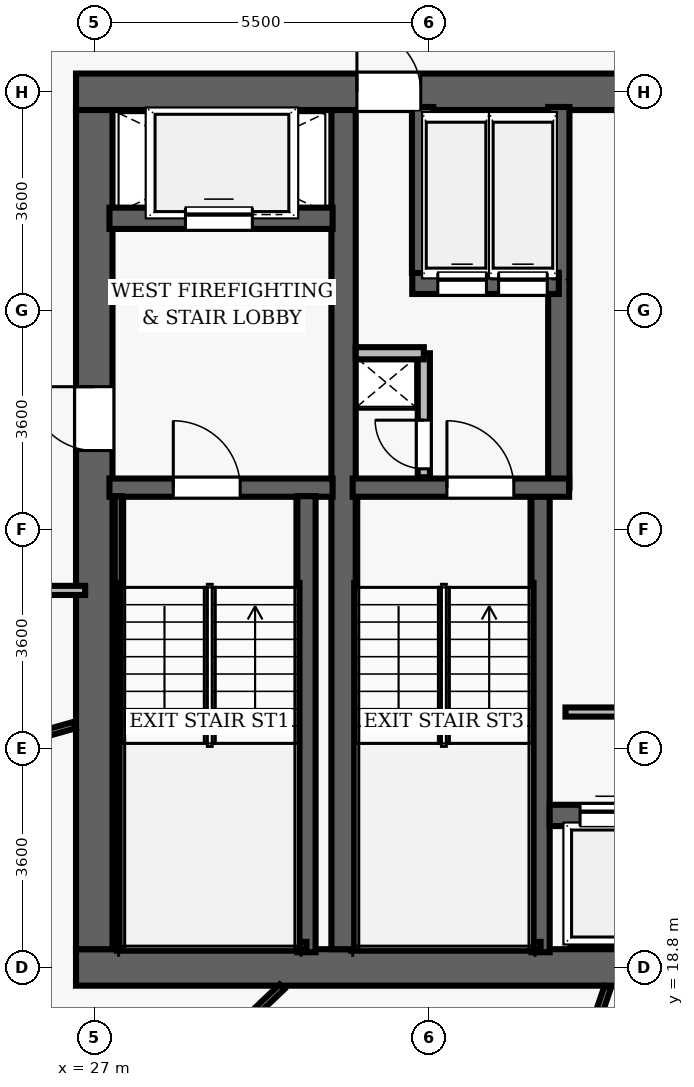
"""IFC4 building model, lengths in metres.
Left out: names, types, materials, properties, quantities, classifications, styles, units other than length and angle.
Written with IfcOpenShell. Run it as: python <this file> out.ifc"""

import sys

from ifc_helpers import new_model, si_unit, direction, frame, frame_2d, origin, place, context, subcontext, project, spatial, rectangle, extrude, element, fill, save


model = new_model("IFC4")
c1 = context("Model", 3, precision=1e-05, world=origin(), true_north=direction((0.0, 1.0)))
c2 = subcontext(c1, "Body", "Model", "MODEL_VIEW")
j1 = project(units=[si_unit("LENGTHUNIT", "METRE"), si_unit("PLANEANGLEUNIT", "RADIAN")], contexts=[c1])
p1 = place(None, origin())
s1 = spatial("IfcSite", under=j1, at=p1, CompositionType="ELEMENT")
p2 = place(p1, origin())
s2 = spatial("IfcBuilding", under=s1, at=p2, CompositionType="ELEMENT")
p3 = place(p2, frame((0.0, 0.0, 116.8)))
s3 = spatial("IfcBuildingStorey", under=s2, at=p3, CompositionType="ELEMENT", Elevation=116.8)
p4 = place(p3, frame((26.7, 18.8, 0.0), z_axis=(0.0, 0.0, 1.0), x_axis=(1.0, 0.0, 0.0)))
e1 = element("IfcWall", 1, at=p4, inside=s3, PredefinedType="SHEAR", context=c2, shape_type="SweptSolid", body=[
    extrude(rectangle(XDim=22.6, YDim=0.6, at=frame_2d((11.3, 0.0))), origin(), (0.0, 0.0, 1.0), 3.5),
])
p5 = place(p4, frame((14.52, 0.0, 0.0)))
e2 = element("IfcOpeningElement", 2, at=p5, cuts=e1, PredefinedType="OPENING", context=c2, shape_type="SweptSolid", body=[
    extrude(rectangle(XDim=1.05, YDim=2.15, at=frame_2d((0.525, 1.075))), frame((0.0, 0.31, 0.0), z_axis=(0.0, -1.0, 0.0), x_axis=(1.0, 0.0, 0.0)), (0.0, 0.0, 1.0), 0.62),
])
p6 = place(p3, frame((26.7, 33.2, 0.0), z_axis=(0.0, 0.0, 1.0), x_axis=(1.0, 0.0, 0.0)))
e3 = element("IfcWall", 3, at=p6, inside=s3, PredefinedType="SHEAR", context=c2, shape_type="SweptSolid", body=[
    extrude(rectangle(XDim=22.6, YDim=0.6, at=frame_2d((11.3, 0.0))), origin(), (0.0, 0.0, 1.0), 3.5),
])
p7 = place(p6, frame((4.62, 0.0, 0.0)))
e4 = element("IfcOpeningElement", 4, at=p7, cuts=e3, PredefinedType="OPENING", context=c2, shape_type="SweptSolid", body=[
    extrude(rectangle(XDim=1.05, YDim=2.15, at=frame_2d((0.525, 1.075))), frame((0.0, 0.31, 0.0), z_axis=(0.0, -1.0, 0.0), x_axis=(1.0, 0.0, 0.0)), (0.0, 0.0, 1.0), 0.62),
])
p8 = place(p6, frame((14.52, 0.0, 0.0)))
e5 = element("IfcOpeningElement", 5, at=p8, cuts=e3, PredefinedType="OPENING", context=c2, shape_type="SweptSolid", body=[
    extrude(rectangle(XDim=1.05, YDim=2.15, at=frame_2d((0.525, 1.075))), frame((0.0, 0.31, 0.0), z_axis=(0.0, -1.0, 0.0), x_axis=(1.0, 0.0, 0.0)), (0.0, 0.0, 1.0), 0.62),
])
p9 = place(p3, frame((27.0, 19.1, 0.0), z_axis=(0.0, 0.0, 1.0), x_axis=(0.0, 1.0, 0.0)))
e6 = element("IfcWall", 6, at=p9, inside=s3, PredefinedType="SHEAR", context=c2, shape_type="SweptSolid", body=[
    extrude(rectangle(XDim=13.8, YDim=0.6, at=frame_2d((6.9, 0.0))), origin(), (0.0, 0.0, 1.0), 3.5),
])
p10 = place(p9, frame((8.2, 0.0, 0.0)))
e7 = element("IfcOpeningElement", 7, at=p10, cuts=e6, PredefinedType="OPENING", context=c2, shape_type="SweptSolid", body=[
    extrude(rectangle(XDim=1.05, YDim=2.15, at=frame_2d((0.525, 1.075))), frame((0.0, 0.31, 0.0), z_axis=(0.0, -1.0, 0.0), x_axis=(1.0, 0.0, 0.0)), (0.0, 0.0, 1.0), 0.62),
])
p11 = place(p3, frame((31.1, 19.1, 0.0), z_axis=(0.0, 0.0, 1.0), x_axis=(0.0, 1.0, 0.0)))
e8 = element("IfcWall", 8, at=p11, inside=s3, PredefinedType="SHEAR", context=c2, shape_type="SweptSolid", body=[
    extrude(rectangle(XDim=13.8, YDim=0.4, at=frame_2d((6.9, 0.0))), origin(), (0.0, 0.0, 1.0), 3.5),
])
p12 = place(p3, frame((27.25, 26.69, 0.0), z_axis=(0.0, 0.0, 1.0), x_axis=(1.0, 0.0, 0.0)))
e9 = element("IfcWall", 9, at=p12, inside=s3, PredefinedType="SHEAR", context=c2, shape_type="SweptSolid", body=[
    extrude(rectangle(XDim=3.67, YDim=0.3, at=frame_2d((1.835, 0.0))), origin(), (0.0, 0.0, 1.0), 3.5),
])
p13 = place(p12, frame((1.05, 0.0, 0.0)))
e10 = element("IfcOpeningElement", 10, at=p13, cuts=e9, PredefinedType="OPENING", context=c2, shape_type="SweptSolid", body=[
    extrude(rectangle(XDim=1.1, YDim=2.15, at=frame_2d((0.55, 1.075))), frame((0.0, 0.16, 0.0), z_axis=(0.0, -1.0, 0.0), x_axis=(1.0, 0.0, 0.0)), (0.0, 0.0, 1.0), 0.32),
])
p14 = place(p3, frame((30.49, 19.05, 0.0), z_axis=(0.0, 0.0, 1.0), x_axis=(0.0, 1.0, 0.0)))
e11 = element("IfcWall", 11, at=p14, inside=s3, PredefinedType="SHEAR", context=c2, shape_type="SweptSolid", body=[
    extrude(rectangle(XDim=7.5, YDim=0.3, at=frame_2d((3.75, 0.0))), origin(), (0.0, 0.0, 1.0), 3.5),
])
p15 = place(p3, frame((27.395, 19.1, 0.0), z_axis=(0.0, 0.0, 1.0), x_axis=(0.0, 1.0, 0.0)))
e12 = element("IfcWall", 12, at=p15, inside=s3, PredefinedType="SHEAR", context=c2, shape_type="SweptSolid", body=[
    extrude(rectangle(XDim=7.45, YDim=0.12, at=frame_2d((3.725, 0.0))), origin(), (0.0, 0.0, 1.0), 3.5),
])
p16 = place(p3, frame((27.395, 19.16, 0.0), z_axis=(0.0, 0.0, 1.0), x_axis=(1.0, 0.0, 0.0)))
e13 = element("IfcWall", 13, at=p16, inside=s3, PredefinedType="SHEAR", context=c2, shape_type="SweptSolid", body=[
    extrude(rectangle(XDim=3.095, YDim=0.12, at=frame_2d((1.547, 0.0))), origin(), (0.0, 0.0, 1.0), 3.5),
])
p17 = place(p3, frame((27.25, 31.12, 0.0), z_axis=(0.0, 0.0, 1.0), x_axis=(1.0, 0.0, 0.0)))
e14 = element("IfcWall", 14, at=p17, inside=s3, PredefinedType="SHEAR", context=c2, shape_type="SweptSolid", body=[
    extrude(rectangle(XDim=3.67, YDim=0.35, at=frame_2d((1.835, 0.0))), origin(), (0.0, 0.0, 1.0), 2.675),
])
p18 = place(p17, frame((1.25, 0.0, 0.0)))
e15 = element("IfcOpeningElement", 15, at=p18, cuts=e14, PredefinedType="OPENING", context=c2, shape_type="SweptSolid", body=[
    extrude(rectangle(XDim=1.1, YDim=2.15, at=frame_2d((0.55, 1.075))), frame((0.0, 0.185, 0.0), z_axis=(0.0, -1.0, 0.0), x_axis=(1.0, 0.0, 0.0)), (0.0, 0.0, 1.0), 0.37),
])
p19 = place(p3, frame((34.34, 19.05, 0.0), z_axis=(0.0, 0.0, 1.0), x_axis=(0.0, 1.0, 0.0)))
e16 = element("IfcWall", 16, at=p19, inside=s3, PredefinedType="SHEAR", context=c2, shape_type="SweptSolid", body=[
    extrude(rectangle(XDim=7.5, YDim=0.3, at=frame_2d((3.75, 0.0))), origin(), (0.0, 0.0, 1.0), 3.5),
])
p20 = place(p3, frame((34.64, 26.69, 0.0), z_axis=(0.0, 0.0, 1.0), x_axis=(0.0, 1.0, 0.0)))
e17 = element("IfcWall", 17, at=p20, inside=s3, PredefinedType="SHEAR", context=c2, shape_type="SweptSolid", body=[
    extrude(rectangle(XDim=6.26, YDim=0.35, at=frame_2d((3.13, 0.0))), origin(), (0.0, 0.0, 1.0), 3.5),
])
p21 = place(p3, frame((31.25, 26.69, 0.0), z_axis=(0.0, 0.0, 1.0), x_axis=(1.0, 0.0, 0.0)))
e18 = element("IfcWall", 18, at=p21, inside=s3, PredefinedType="SHEAR", context=c2, shape_type="SweptSolid", body=[
    extrude(rectangle(XDim=3.56, YDim=0.3, at=frame_2d((1.78, 0.0))), origin(), (0.0, 0.0, 1.0), 3.5),
])
p22 = place(p21, frame((1.55, 0.0, 0.0)))
e19 = element("IfcOpeningElement", 19, at=p22, cuts=e18, PredefinedType="OPENING", context=c2, shape_type="SweptSolid", body=[
    extrude(rectangle(XDim=1.1, YDim=2.15, at=frame_2d((0.55, 1.075))), frame((0.0, 0.16, 0.0), z_axis=(0.0, -1.0, 0.0), x_axis=(1.0, 0.0, 0.0)), (0.0, 0.0, 1.0), 0.32),
])
p23 = place(p3, frame((31.3, 19.16, 0.0), z_axis=(0.0, 0.0, 1.0), x_axis=(1.0, 0.0, 0.0)))
e20 = element("IfcWall", 20, at=p23, inside=s3, PredefinedType="SHEAR", context=c2, shape_type="SweptSolid", body=[
    extrude(rectangle(XDim=3.04, YDim=0.12, at=frame_2d((1.52, 0.0))), origin(), (0.0, 0.0, 1.0), 3.5),
])
p24 = place(p3, frame((32.23, 30.05, 0.0), z_axis=(0.0, 0.0, 1.0), x_axis=(1.0, 0.0, 0.0)))
e21 = element("IfcWall", 21, at=p24, inside=s3, PredefinedType="SHEAR", context=c2, shape_type="SweptSolid", body=[
    extrude(rectangle(XDim=2.41, YDim=0.35, at=frame_2d((1.205, 0.0))), origin(), (0.0, 0.0, 1.0), 2.675),
])
p25 = place(p24, frame((0.42, 0.0, 0.0)))
e22 = element("IfcOpeningElement", 22, at=p25, cuts=e21, PredefinedType="OPENING", context=c2, shape_type="SweptSolid", body=[
    extrude(rectangle(XDim=0.8, YDim=2.15, at=frame_2d((0.4, 1.075))), frame((0.0, 0.185, 0.0), z_axis=(0.0, -1.0, 0.0), x_axis=(1.0, 0.0, 0.0)), (0.0, 0.0, 1.0), 0.37),
])
p26 = place(p24, frame((1.42, 0.0, 0.0)))
e23 = element("IfcOpeningElement", 23, at=p26, cuts=e21, PredefinedType="OPENING", context=c2, shape_type="SweptSolid", body=[
    extrude(rectangle(XDim=0.8, YDim=2.15, at=frame_2d((0.4, 1.075))), frame((0.0, 0.185, 0.0), z_axis=(0.0, -1.0, 0.0), x_axis=(1.0, 0.0, 0.0)), (0.0, 0.0, 1.0), 0.37),
])
p27 = place(p3, frame((32.4, 30.22, 0.0), z_axis=(0.0, 0.0, 1.0), x_axis=(0.0, 1.0, 0.0)))
e24 = element("IfcWall", 24, at=p27, inside=s3, PredefinedType="SHEAR", context=c2, shape_type="SweptSolid", body=[
    extrude(rectangle(XDim=2.73, YDim=0.35, at=frame_2d((1.365, 0.0))), origin(), (0.0, 0.0, 1.0), 2.675),
])
p28 = place(p3, frame((32.42, 26.86, 0.0), z_axis=(0.0, 0.0, 1.0), x_axis=(0.0, 1.0, 0.0)))
e25 = element("IfcWall", 25, at=p28, inside=s3, PredefinedType="PARTITIONING", context=c2, shape_type="SweptSolid", body=[
    extrude(rectangle(XDim=2.04, YDim=0.2, at=frame_2d((1.02, 0.0))), origin(), (0.0, 0.0, 1.0), 2.675),
])
p29 = place(p28, frame((0.14, 0.0, 0.0)))
e26 = element("IfcOpeningElement", 26, at=p29, cuts=e25, PredefinedType="OPENING", context=c2, shape_type="SweptSolid", body=[
    extrude(rectangle(XDim=0.8, YDim=2.05, at=frame_2d((0.4, 1.025))), frame((0.0, 0.11, 0.0), z_axis=(0.0, -1.0, 0.0), x_axis=(1.0, 0.0, 0.0)), (0.0, 0.0, 1.0), 0.22),
])
p30 = place(p3, frame((31.3, 28.9, 0.0), z_axis=(0.0, 0.0, 1.0), x_axis=(1.0, 0.0, 0.0)))
e27 = element("IfcWall", 27, at=p30, inside=s3, PredefinedType="PARTITIONING", context=c2, shape_type="SweptSolid", body=[
    extrude(rectangle(XDim=1.12, YDim=0.2, at=frame_2d((0.56, 0.0))), origin(), (0.0, 0.0, 1.0), 2.675),
])
p31 = place(p3, frame((34.49, 21.3, 0.0), z_axis=(0.0, 0.0, 1.0), x_axis=(1.0, 0.0, 0.0)))
e28 = element("IfcWall", 28, at=p31, inside=s3, PredefinedType="SHEAR", context=c2, shape_type="SweptSolid", body=[
    extrude(rectangle(XDim=6.68, YDim=0.35, at=frame_2d((3.34, 0.0))), origin(), (0.0, 0.0, 1.0), 2.675),
])
p32 = place(p31, frame((0.5, 0.0, 0.0)))
e29 = element("IfcOpeningElement", 29, at=p32, cuts=e28, PredefinedType="OPENING", context=c2, shape_type="SweptSolid", body=[
    extrude(rectangle(XDim=0.9, YDim=2.15, at=frame_2d((0.45, 1.075))), frame((0.0, 0.185, 0.0), z_axis=(0.0, -1.0, 0.0), x_axis=(1.0, 0.0, 0.0)), (0.0, 0.0, 1.0), 0.37),
])
p33 = place(p31, frame((2.58, 0.0, 0.0)))
e30 = element("IfcOpeningElement", 30, at=p33, cuts=e28, PredefinedType="OPENING", context=c2, shape_type="SweptSolid", body=[
    extrude(rectangle(XDim=0.9, YDim=2.15, at=frame_2d((0.45, 1.075))), frame((0.0, 0.185, 0.0), z_axis=(0.0, -1.0, 0.0), x_axis=(1.0, 0.0, 0.0)), (0.0, 0.0, 1.0), 0.37),
])
p34 = place(p31, frame((4.66, 0.0, 0.0)))
e31 = element("IfcOpeningElement", 31, at=p34, cuts=e28, PredefinedType="OPENING", context=c2, shape_type="SweptSolid", body=[
    extrude(rectangle(XDim=0.9, YDim=2.15, at=frame_2d((0.45, 1.075))), frame((0.0, 0.185, 0.0), z_axis=(0.0, -1.0, 0.0), x_axis=(1.0, 0.0, 0.0)), (0.0, 0.0, 1.0), 0.37),
])
p35 = place(p3, frame((34.75, 23.0, 0.0), z_axis=(0.0, 0.0, 1.0), x_axis=(1.0, 0.0, 0.0)))
e32 = element("IfcWall", 32, at=p35, inside=s3, PredefinedType="PARTITIONING", context=c2, shape_type="SweptSolid", body=[
    extrude(rectangle(XDim=6.25, YDim=0.15, at=frame_2d((3.125, 0.0))), origin(), (0.0, 0.0, 1.0), 2.675),
])
p36 = place(p3, frame((14.5, 25.0, 0.0), z_axis=(0.0, 0.0, 1.0), x_axis=(1.0, 0.0, 0.0)))
e33 = element("IfcWall", 33, at=p36, inside=s3, PredefinedType="PARTITIONING", context=c2, shape_type="SweptSolid", body=[
    extrude(rectangle(XDim=12.35, YDim=0.15, at=frame_2d((6.175, 0.0))), origin(), (0.0, 0.0, 1.0), 2.675),
])
p37 = place(p36, frame((8.788, 0.0, 0.0)))
e34 = element("IfcOpeningElement", 34, at=p37, cuts=e33, PredefinedType="OPENING", context=c2, shape_type="SweptSolid", body=[
    extrude(rectangle(XDim=0.95, YDim=2.15, at=frame_2d((0.475, 1.075))), frame((0.0, 0.085, 0.0), z_axis=(0.0, -1.0, 0.0), x_axis=(1.0, 0.0, 0.0)), (0.0, 0.0, 1.0), 0.17),
])
p38 = place(p3, frame((26.68, 22.787, 0.0), z_axis=(0.0, 0.0, 1.0), x_axis=(-0.962000208621, -0.273048711062, 0.0)))
e35 = element("IfcWall", 35, at=p38, inside=s3, PredefinedType="PARTITIONING", context=c2, shape_type="SweptSolid", body=[
    extrude(rectangle(XDim=14.58, YDim=0.11, at=frame_2d((7.29, 0.0))), origin(), (0.0, 0.0, 1.0), 2.675),
])
p39 = place(p3, frame((30.086, 18.48, 0.0), z_axis=(0.0, 0.0, 1.0), x_axis=(-0.724907697958, -0.688846012866, 0.0)))
e36 = element("IfcWall", 36, at=p39, inside=s3, PredefinedType="PARTITIONING", context=c2, shape_type="SweptSolid", body=[
    extrude(rectangle(XDim=12.958, YDim=0.11, at=frame_2d((6.479, 0.0))), origin(), (0.0, 0.0, 1.0), 2.675),
])
p40 = place(p3, frame((35.445, 18.48, 0.0), z_axis=(0.0, 0.0, 1.0), x_axis=(-0.321754532436, -0.946823120153, 0.0)))
e37 = element("IfcWall", 37, at=p40, inside=s3, PredefinedType="PARTITIONING", context=c2, shape_type="SweptSolid", body=[
    extrude(rectangle(XDim=14.974, YDim=0.11, at=frame_2d((7.487, 0.0))), origin(), (0.0, 0.0, 1.0), 2.675),
])
p41 = place(p13, origin())
e38 = element("IfcDoor", 38, at=p41, inside=s3, OperationType="SINGLE_SWING_LEFT", PredefinedType="DOOR", context=c2, shape_type="SweptSolid", body=[
    extrude(rectangle(XDim=1.1, YDim=2.15, at=frame_2d((0.55, 1.075))), frame((0.0, 0.025, 0.0), z_axis=(0.0, -1.0, 0.0), x_axis=(1.0, 0.0, 0.0)), (0.0, 0.0, 1.0), 0.05),
])
fill(e10, e38)
p42 = place(p10, origin())
e39 = element("IfcDoor", 39, at=p42, inside=s3, OperationType="SINGLE_SWING_RIGHT", PredefinedType="DOOR", context=c2, shape_type="SweptSolid", body=[
    extrude(rectangle(XDim=1.05, YDim=2.15, at=frame_2d((0.525, 1.075))), frame((0.0, 0.025, 0.0), z_axis=(0.0, -1.0, 0.0), x_axis=(1.0, 0.0, 0.0)), (0.0, 0.0, 1.0), 0.05),
])
fill(e7, e39)
p43 = place(p22, origin())
e40 = element("IfcDoor", 40, at=p43, inside=s3, OperationType="SINGLE_SWING_LEFT", PredefinedType="DOOR", context=c2, shape_type="SweptSolid", body=[
    extrude(rectangle(XDim=1.1, YDim=2.15, at=frame_2d((0.55, 1.075))), frame((0.0, 0.025, 0.0), z_axis=(0.0, -1.0, 0.0), x_axis=(1.0, 0.0, 0.0)), (0.0, 0.0, 1.0), 0.05),
])
fill(e19, e40)
p44 = place(p29, origin())
e41 = element("IfcDoor", 41, at=p44, inside=s3, OperationType="SINGLE_SWING_RIGHT", PredefinedType="DOOR", context=c2, shape_type="SweptSolid", body=[
    extrude(rectangle(XDim=0.8, YDim=2.05, at=frame_2d((0.4, 1.025))), frame((0.0, 0.025, 0.0), z_axis=(0.0, -1.0, 0.0), x_axis=(1.0, 0.0, 0.0)), (0.0, 0.0, 1.0), 0.05),
])
fill(e26, e41)
p45 = place(p7, origin())
e42 = element("IfcDoor", 42, at=p45, inside=s3, OperationType="SINGLE_SWING_LEFT", PredefinedType="DOOR", context=c2, shape_type="SweptSolid", body=[
    extrude(rectangle(XDim=1.05, YDim=2.15, at=frame_2d((0.525, 1.075))), frame((0.0, 0.025, 0.0), z_axis=(0.0, -1.0, 0.0), x_axis=(1.0, 0.0, 0.0)), (0.0, 0.0, 1.0), 0.05),
])
fill(e4, e42)
p46 = place(p32, origin())
e43 = element("IfcDoor", 43, at=p46, inside=s3, OperationType="SLIDING_TO_LEFT", PredefinedType="DOOR", context=c2, shape_type="SweptSolid", body=[
    extrude(rectangle(XDim=0.9, YDim=2.15, at=frame_2d((0.45, 1.075))), frame((0.0, 0.025, 0.0), z_axis=(0.0, -1.0, 0.0), x_axis=(1.0, 0.0, 0.0)), (0.0, 0.0, 1.0), 0.05),
])
fill(e29, e43)
p47 = place(p18, origin())
e44 = element("IfcDoor", 44, at=p47, inside=s3, OperationType="SLIDING_TO_LEFT", PredefinedType="DOOR", context=c2, shape_type="SweptSolid", body=[
    extrude(rectangle(XDim=1.1, YDim=2.15, at=frame_2d((0.55, 1.075))), frame((0.0, 0.025, 0.0), z_axis=(0.0, -1.0, 0.0), x_axis=(1.0, 0.0, 0.0)), (0.0, 0.0, 1.0), 0.05),
])
fill(e15, e44)
p48 = place(p25, origin())
e45 = element("IfcDoor", 45, at=p48, inside=s3, OperationType="SLIDING_TO_LEFT", PredefinedType="DOOR", context=c2, shape_type="SweptSolid", body=[
    extrude(rectangle(XDim=0.8, YDim=2.15, at=frame_2d((0.4, 1.075))), frame((0.0, 0.025, 0.0), z_axis=(0.0, -1.0, 0.0), x_axis=(1.0, 0.0, 0.0)), (0.0, 0.0, 1.0), 0.05),
])
fill(e22, e45)
p49 = place(p26, origin())
e46 = element("IfcDoor", 46, at=p49, inside=s3, OperationType="SLIDING_TO_LEFT", PredefinedType="DOOR", context=c2, shape_type="SweptSolid", body=[
    extrude(rectangle(XDim=0.8, YDim=2.15, at=frame_2d((0.4, 1.075))), frame((0.0, 0.025, 0.0), z_axis=(0.0, -1.0, 0.0), x_axis=(1.0, 0.0, 0.0)), (0.0, 0.0, 1.0), 0.05),
])
fill(e23, e46)
save(model, sys.argv[1])
